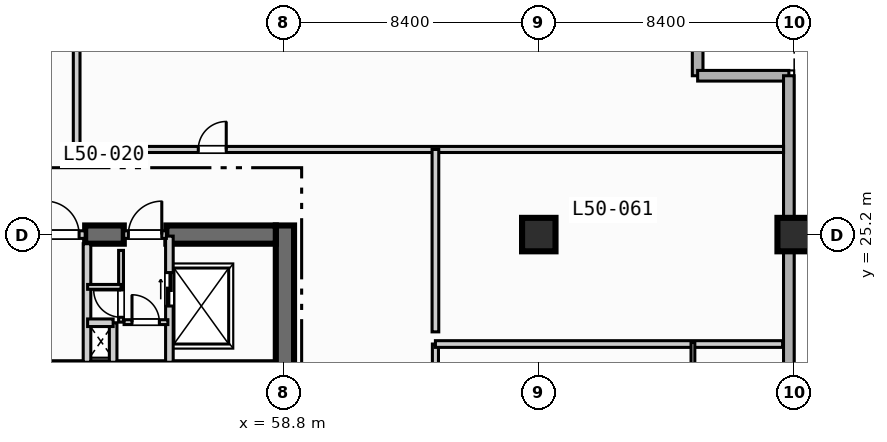
"""IFC4 building model, lengths in metres.
Left out: names, types, materials, properties, quantities, classifications, styles, units other than length and angle.
Written with IfcOpenShell. Run it as: python <this file> out.ifc"""

import sys

from ifc_helpers import new_model, si_unit, direction, frame, frame_2d, origin, origin_2d, place, context, subcontext, project, spatial, rectangle, extrude, element, fill, save


model = new_model("IFC4")
c1 = context("Model", 3, precision=1e-05, world=origin(), true_north=direction((0.0, 1.0)))
c2 = subcontext(c1, "Body", "Model", "MODEL_VIEW")
j1 = project(units=[si_unit("LENGTHUNIT", "METRE"), si_unit("PLANEANGLEUNIT", "RADIAN")], contexts=[c1])
p1 = place(None, origin())
s1 = spatial("IfcSite", under=j1, at=p1, CompositionType="ELEMENT")
p2 = place(p1, origin())
s2 = spatial("IfcBuilding", under=s1, at=p2, CompositionType="ELEMENT")
p3 = place(p2, frame((0.0, 0.0, 205.0)))
s3 = spatial("IfcBuildingStorey", under=s2, at=p3, CompositionType="ELEMENT", Elevation=205.0)
p4 = place(p3, frame((58.85, 20.5, 0.0), z_axis=(0.0, 0.0, 1.0), x_axis=(0.0, 1.0, 0.0)))
e1 = element("IfcWall", 1, at=p4, inside=s3, PredefinedType="SHEAR", context=c2, shape_type="SweptSolid", body=[
    extrude(rectangle(XDim=5.0, YDim=0.6, at=frame_2d((2.5, 0.0))), origin(), (0.0, 0.0, 1.0), 3.47),
])
p5 = place(p3, frame((52.28, 25.2, 0.0), z_axis=(0.0, 0.0, 1.0), x_axis=(1.0, 0.0, 0.0)))
e2 = element("IfcWall", 2, at=p5, inside=s3, PredefinedType="SHEAR", context=c2, shape_type="SweptSolid", body=[
    extrude(rectangle(XDim=1.27, YDim=0.6, at=frame_2d((0.635, 0.0))), origin(), (0.0, 0.0, 1.0), 3.47),
])
p6 = place(p3, frame((54.95, 25.2, 0.0), z_axis=(0.0, 0.0, 1.0), x_axis=(1.0, 0.0, 0.0)))
e3 = element("IfcWall", 3, at=p6, inside=s3, PredefinedType="SHEAR", context=c2, shape_type="SweptSolid", body=[
    extrude(rectangle(XDim=3.6, YDim=0.6, at=frame_2d((1.8, 0.0))), origin(), (0.0, 0.0, 1.0), 3.47),
])
for number, where, z_axis, x_axis in (
    (4, (67.2, 25.2, 0.0), (0.0, 0.0, 1.0), (1.0, 0.0, 0.0)),
    (5, (75.6, 25.2, 0.0), (0.0, 0.0, 1.0), (1.0, 0.0, 0.0)),
):
    element("IfcColumn", number, at=place(p3, frame(where, z_axis=z_axis, x_axis=x_axis)), inside=s3, PredefinedType="COLUMN", context=c2, shape_type="SweptSolid", body=[
        extrude(rectangle(XDim=1.1, YDim=1.1, at=origin_2d()), origin(), (0.0, 0.0, 1.0), 3.7),
    ])
for number, where, z_axis, x_axis in (
    (6, (72.425, 33.425, 0.0), (0.0, 0.0, 1.0), (0.0, -1.0, 0.0)),
    (7, (72.425, 30.425, 0.0), (0.0, 0.0, 1.0), (1.0, 0.0, 0.0)),
):
    element("IfcWall", number, at=place(p3, frame(where, z_axis=z_axis, x_axis=x_axis)), inside=s3, PredefinedType="STANDARD", context=c2, shape_type="SweptSolid", body=[
        extrude(rectangle(XDim=3.0, YDim=0.35, at=frame_2d((1.5, 0.0))), origin(), (0.0, 0.0, 1.0), 3.47),
    ])
p7 = place(p3, frame((75.425, 30.425, 0.0), z_axis=(0.0, 0.0, 1.0), x_axis=(0.0, -1.0, 0.0)))
e8 = element("IfcWall", 8, at=p7, inside=s3, PredefinedType="STANDARD", context=c2, shape_type="SweptSolid", body=[
    extrude(rectangle(XDim=27.25, YDim=0.35, at=frame_2d((13.625, 0.0))), origin(), (0.0, 0.0, 1.0), 3.47),
])
p8 = place(p7, frame((16.625, 0.0, 0.85)))
e9 = element("IfcOpeningElement", 9, at=p8, cuts=e8, PredefinedType="OPENING", context=c2, shape_type="SweptSolid", body=[
    extrude(rectangle(XDim=2.4, YDim=1.95, at=frame_2d((1.2, 0.975))), frame((0.0, 0.185, 0.0), z_axis=(0.0, -1.0, 0.0), x_axis=(1.0, 0.0, 0.0)), (0.0, 0.0, 1.0), 0.37),
])
p9 = place(p3, frame((50.8, 25.2, 0.0), z_axis=(0.0, 0.0, 1.0), x_axis=(1.0, 0.0, 0.0)))
e10 = element("IfcWall", 10, at=p9, inside=s3, PredefinedType="SOLIDWALL", context=c2, shape_type="SweptSolid", body=[
    extrude(rectangle(XDim=1.48, YDim=0.25, at=frame_2d((0.74, 0.0))), origin(), (0.0, 0.0, 1.0), 3.47),
])
p10 = place(p9, frame((0.18, 0.0, 0.0)))
e11 = element("IfcOpeningElement", 11, at=p10, cuts=e10, PredefinedType="OPENING", context=c2, shape_type="SweptSolid", body=[
    extrude(rectangle(XDim=1.1, YDim=2.15, at=frame_2d((0.55, 1.075))), frame((0.0, 0.135, 0.0), z_axis=(0.0, -1.0, 0.0), x_axis=(1.0, 0.0, 0.0)), (0.0, 0.0, 1.0), 0.27),
])
p11 = place(p3, frame((52.34, 21.0, 0.0), z_axis=(0.0, 0.0, 1.0), x_axis=(0.0, 1.0, 0.0)))
e12 = element("IfcWall", 12, at=p11, inside=s3, PredefinedType="SOLIDWALL", context=c2, shape_type="SweptSolid", body=[
    extrude(rectangle(XDim=3.9, YDim=0.25, at=frame_2d((1.95, 0.0))), origin(), (0.0, 0.0, 1.0), 3.47),
])
p12 = place(p3, frame((55.05, 21.0, 0.0), z_axis=(0.0, 0.0, 1.0), x_axis=(0.0, 1.0, 0.0)))
e13 = element("IfcWall", 13, at=p12, inside=s3, PredefinedType="SOLIDWALL", context=c2, shape_type="SweptSolid", body=[
    extrude(rectangle(XDim=4.15, YDim=0.25, at=frame_2d((2.075, 0.0))), origin(), (0.0, 0.0, 1.0), 3.47),
])
p13 = place(p12, frame((1.85, 0.0, 0.0)))
e14 = element("IfcOpeningElement", 14, at=p13, cuts=e13, PredefinedType="OPENING", context=c2, shape_type="SweptSolid", body=[
    extrude(rectangle(XDim=1.1, YDim=2.15, at=frame_2d((0.55, 1.075))), frame((0.0, 0.135, 0.0), z_axis=(0.0, -1.0, 0.0), x_axis=(1.0, 0.0, 0.0)), (0.0, 0.0, 1.0), 0.27),
])
p14 = place(p3, frame((53.55, 25.2, 0.0), z_axis=(0.0, 0.0, 1.0), x_axis=(1.0, 0.0, 0.0)))
e15 = element("IfcWall", 15, at=p14, inside=s3, PredefinedType="SOLIDWALL", context=c2, shape_type="SweptSolid", body=[
    extrude(rectangle(XDim=1.4, YDim=0.25, at=frame_2d((0.7, 0.0))), origin(), (0.0, 0.0, 1.0), 3.47),
])
p15 = place(p14, frame((0.15, 0.0, 0.0)))
e16 = element("IfcOpeningElement", 16, at=p15, cuts=e15, PredefinedType="OPENING", context=c2, shape_type="SweptSolid", body=[
    extrude(rectangle(XDim=1.1, YDim=2.15, at=frame_2d((0.55, 1.075))), frame((0.0, 0.135, 0.0), z_axis=(0.0, -1.0, 0.0), x_axis=(1.0, 0.0, 0.0)), (0.0, 0.0, 1.0), 0.27),
])
p16 = place(p3, frame((53.2, 21.0, 0.0), z_axis=(0.0, 0.0, 1.0), x_axis=(0.0, 1.0, 0.0)))
e17 = element("IfcWall", 17, at=p16, inside=s3, PredefinedType="SOLIDWALL", context=c2, shape_type="SweptSolid", body=[
    extrude(rectangle(XDim=1.3, YDim=0.25, at=frame_2d((0.65, 0.0))), origin(), (0.0, 0.0, 1.0), 3.47),
])
p17 = place(p3, frame((52.36, 22.3, 0.0), z_axis=(0.0, 0.0, 1.0), x_axis=(1.0, 0.0, 0.0)))
e18 = element("IfcWall", 18, at=p17, inside=s3, PredefinedType="SOLIDWALL", context=c2, shape_type="SweptSolid", body=[
    extrude(rectangle(XDim=0.84, YDim=0.25, at=frame_2d((0.42, 0.0))), origin(), (0.0, 0.0, 1.0), 3.47),
])
p18 = place(p3, frame((53.56, 22.32, 0.0), z_axis=(0.0, 0.0, 1.0), x_axis=(1.0, 0.0, 0.0)))
e19 = element("IfcWall", 19, at=p18, inside=s3, PredefinedType="PARTITIONING", context=c2, shape_type="SweptSolid", body=[
    extrude(rectangle(XDim=1.44, YDim=0.16, at=frame_2d((0.72, 0.0))), origin(), (0.0, 0.0, 1.0), 3.47),
])
p19 = place(p18, frame((0.26, 0.0, 0.0)))
e20 = element("IfcOpeningElement", 20, at=p19, cuts=e19, PredefinedType="OPENING", context=c2, shape_type="SweptSolid", body=[
    extrude(rectangle(XDim=0.9, YDim=2.1, at=frame_2d((0.45, 1.05))), frame((0.0, 0.09, 0.0), z_axis=(0.0, -1.0, 0.0), x_axis=(1.0, 0.0, 0.0)), (0.0, 0.0, 1.0), 0.18),
])
p20 = place(p3, frame((53.46, 22.32, 0.0), z_axis=(0.0, 0.0, 1.0), x_axis=(0.0, 1.0, 0.0)))
e21 = element("IfcWall", 21, at=p20, inside=s3, PredefinedType="PARTITIONING", context=c2, shape_type="SweptSolid", body=[
    extrude(rectangle(XDim=2.36, YDim=0.16, at=frame_2d((1.18, 0.0))), origin(), (0.0, 0.0, 1.0), 3.47),
])
p21 = place(p20, frame((0.16, 0.0, 0.0)))
e22 = element("IfcOpeningElement", 22, at=p21, cuts=e21, PredefinedType="OPENING", context=c2, shape_type="SweptSolid", body=[
    extrude(rectangle(XDim=0.9, YDim=2.1, at=frame_2d((0.45, 1.05))), frame((0.0, 0.09, 0.0), z_axis=(0.0, -1.0, 0.0), x_axis=(1.0, 0.0, 0.0)), (0.0, 0.0, 1.0), 0.18),
])
p22 = place(p3, frame((52.36, 23.48, 0.0), z_axis=(0.0, 0.0, 1.0), x_axis=(1.0, 0.0, 0.0)))
e23 = element("IfcWall", 23, at=p22, inside=s3, PredefinedType="PARTITIONING", context=c2, shape_type="SweptSolid", body=[
    extrude(rectangle(XDim=1.1, YDim=0.16, at=frame_2d((0.55, 0.0))), origin(), (0.0, 0.0, 1.0), 3.47),
])
p23 = place(p3, frame((63.8, 3.4, 0.0), z_axis=(0.0, 0.0, 1.0), x_axis=(0.0, 1.0, 0.0)))
e24 = element("IfcWall", 24, at=p23, inside=s3, PredefinedType="PARTITIONING", context=c2, shape_type="SweptSolid", body=[
    extrude(rectangle(XDim=18.2, YDim=0.2, at=frame_2d((9.1, 0.0))), origin(), (0.0, 0.0, 1.0), 3.47),
])
p24 = place(p23, frame((6.2, 0.0, 0.0)))
e25 = element("IfcOpeningElement", 25, at=p24, cuts=e24, PredefinedType="OPENING", context=c2, shape_type="SweptSolid", body=[
    extrude(rectangle(XDim=1.0, YDim=2.15, at=frame_2d((0.5, 1.075))), frame((0.0, 0.11, 0.0), z_axis=(0.0, -1.0, 0.0), x_axis=(1.0, 0.0, 0.0)), (0.0, 0.0, 1.0), 0.22),
])
p25 = place(p3, frame((63.8, 21.6, 0.0), z_axis=(0.0, 0.0, 1.0), x_axis=(1.0, 0.0, 0.0)))
e26 = element("IfcWall", 26, at=p25, inside=s3, PredefinedType="PARTITIONING", context=c2, shape_type="SweptSolid", body=[
    extrude(rectangle(XDim=11.42, YDim=0.22, at=frame_2d((5.71, 0.0))), origin(), (0.0, 0.0, 1.0), 3.47),
])
p26 = place(p3, frame((72.27, 3.25, 0.0), z_axis=(0.0, 0.0, 1.0), x_axis=(0.0, 1.0, 0.0)))
e27 = element("IfcWall", 27, at=p26, inside=s3, PredefinedType="PARTITIONING", context=c2, shape_type="SweptSolid", body=[
    extrude(rectangle(XDim=18.4, YDim=0.125, at=frame_2d((9.2, 0.0))), origin(), (0.0, 0.0, 1.0), 3.47),
])
p27 = place(p26, frame((8.19, 0.0, 0.0)))
e28 = element("IfcOpeningElement", 28, at=p27, cuts=e27, PredefinedType="OPENING", context=c2, shape_type="SweptSolid", body=[
    extrude(rectangle(XDim=0.92, YDim=2.1, at=frame_2d((0.46, 1.05))), frame((0.0, 0.073, 0.0), z_axis=(0.0, -1.0, 0.0), x_axis=(1.0, 0.0, 0.0)), (0.0, 0.0, 1.0), 0.145),
])
p28 = place(p3, frame((52.0, 28.0, 0.0), z_axis=(0.0, 0.0, 1.0), x_axis=(1.0, 0.0, 0.0)))
e29 = element("IfcWall", 29, at=p28, inside=s3, PredefinedType="PARTITIONING", context=c2, shape_type="SweptSolid", body=[
    extrude(rectangle(XDim=23.25, YDim=0.2, at=frame_2d((11.625, 0.0))), origin(), (0.0, 0.0, 1.0), 3.47),
])
p29 = place(p28, frame((4.0, 0.0, 0.0)))
e30 = element("IfcOpeningElement", 30, at=p29, cuts=e29, PredefinedType="OPENING", context=c2, shape_type="SweptSolid", body=[
    extrude(rectangle(XDim=0.92, YDim=2.1, at=frame_2d((0.46, 1.05))), frame((0.0, 0.11, 0.0), z_axis=(0.0, -1.0, 0.0), x_axis=(1.0, 0.0, 0.0)), (0.0, 0.0, 1.0), 0.22),
])
p30 = place(p3, frame((52.0, 28.0, 0.0), z_axis=(0.0, 0.0, 1.0), x_axis=(0.0, 1.0, 0.0)))
e31 = element("IfcWall", 31, at=p30, inside=s3, PredefinedType="PARTITIONING", context=c2, shape_type="SweptSolid", body=[
    extrude(rectangle(XDim=5.3, YDim=0.22, at=frame_2d((2.65, 0.0))), origin(), (0.0, 0.0, 1.0), 3.47),
])
p31 = place(p3, frame((63.8, 22.0, 0.0), z_axis=(0.0, 0.0, 1.0), x_axis=(0.0, 1.0, 0.0)))
e32 = element("IfcWall", 32, at=p31, inside=s3, PredefinedType="PARTITIONING", context=c2, shape_type="SweptSolid", body=[
    extrude(rectangle(XDim=6.0, YDim=0.22, at=frame_2d((3.0, 0.0))), origin(), (0.0, 0.0, 1.0), 3.47),
])
p32 = place(p10, origin())
e33 = element("IfcDoor", 33, at=p32, inside=s3, OperationType="SINGLE_SWING_LEFT", PredefinedType="DOOR", context=c2, shape_type="SweptSolid", body=[
    extrude(rectangle(XDim=1.1, YDim=2.15, at=frame_2d((0.55, 1.075))), frame((0.0, 0.025, 0.0), z_axis=(0.0, -1.0, 0.0), x_axis=(1.0, 0.0, 0.0)), (0.0, 0.0, 1.0), 0.05),
])
fill(e11, e33)
p33 = place(p13, origin())
e34 = element("IfcDoor", 34, at=p33, inside=s3, OperationType="SLIDING_TO_LEFT", PredefinedType="DOOR", context=c2, shape_type="SweptSolid", body=[
    extrude(rectangle(XDim=1.1, YDim=2.15, at=frame_2d((0.55, 1.075))), frame((0.0, 0.025, 0.0), z_axis=(0.0, -1.0, 0.0), x_axis=(1.0, 0.0, 0.0)), (0.0, 0.0, 1.0), 0.05),
])
fill(e14, e34)
p34 = place(p15, origin())
e35 = element("IfcDoor", 35, at=p34, inside=s3, OperationType="SINGLE_SWING_RIGHT", PredefinedType="DOOR", context=c2, shape_type="SweptSolid", body=[
    extrude(rectangle(XDim=1.1, YDim=2.15, at=frame_2d((0.55, 1.075))), frame((0.0, 0.025, 0.0), z_axis=(0.0, -1.0, 0.0), x_axis=(1.0, 0.0, 0.0)), (0.0, 0.0, 1.0), 0.05),
])
fill(e16, e35)
p35 = place(p19, origin())
e36 = element("IfcDoor", 36, at=p35, inside=s3, OperationType="SINGLE_SWING_LEFT", PredefinedType="DOOR", context=c2, shape_type="SweptSolid", body=[
    extrude(rectangle(XDim=0.9, YDim=2.1, at=frame_2d((0.45, 1.05))), frame((0.0, 0.025, 0.0), z_axis=(0.0, -1.0, 0.0), x_axis=(1.0, 0.0, 0.0)), (0.0, 0.0, 1.0), 0.05),
])
fill(e20, e36)
p36 = place(p21, origin())
e37 = element("IfcDoor", 37, at=p36, inside=s3, OperationType="SINGLE_SWING_RIGHT", PredefinedType="DOOR", context=c2, shape_type="SweptSolid", body=[
    extrude(rectangle(XDim=0.9, YDim=2.1, at=frame_2d((0.45, 1.05))), frame((0.0, 0.025, 0.0), z_axis=(0.0, -1.0, 0.0), x_axis=(1.0, 0.0, 0.0)), (0.0, 0.0, 1.0), 0.05),
])
fill(e22, e37)
p37 = place(p29, origin())
e38 = element("IfcDoor", 38, at=p37, inside=s3, OperationType="SINGLE_SWING_RIGHT", PredefinedType="DOOR", context=c2, shape_type="SweptSolid", body=[
    extrude(rectangle(XDim=0.92, YDim=2.1, at=frame_2d((0.46, 1.05))), frame((0.0, 0.025, 0.0), z_axis=(0.0, -1.0, 0.0), x_axis=(1.0, 0.0, 0.0)), (0.0, 0.0, 1.0), 0.05),
])
fill(e30, e38)
save(model, sys.argv[1])
